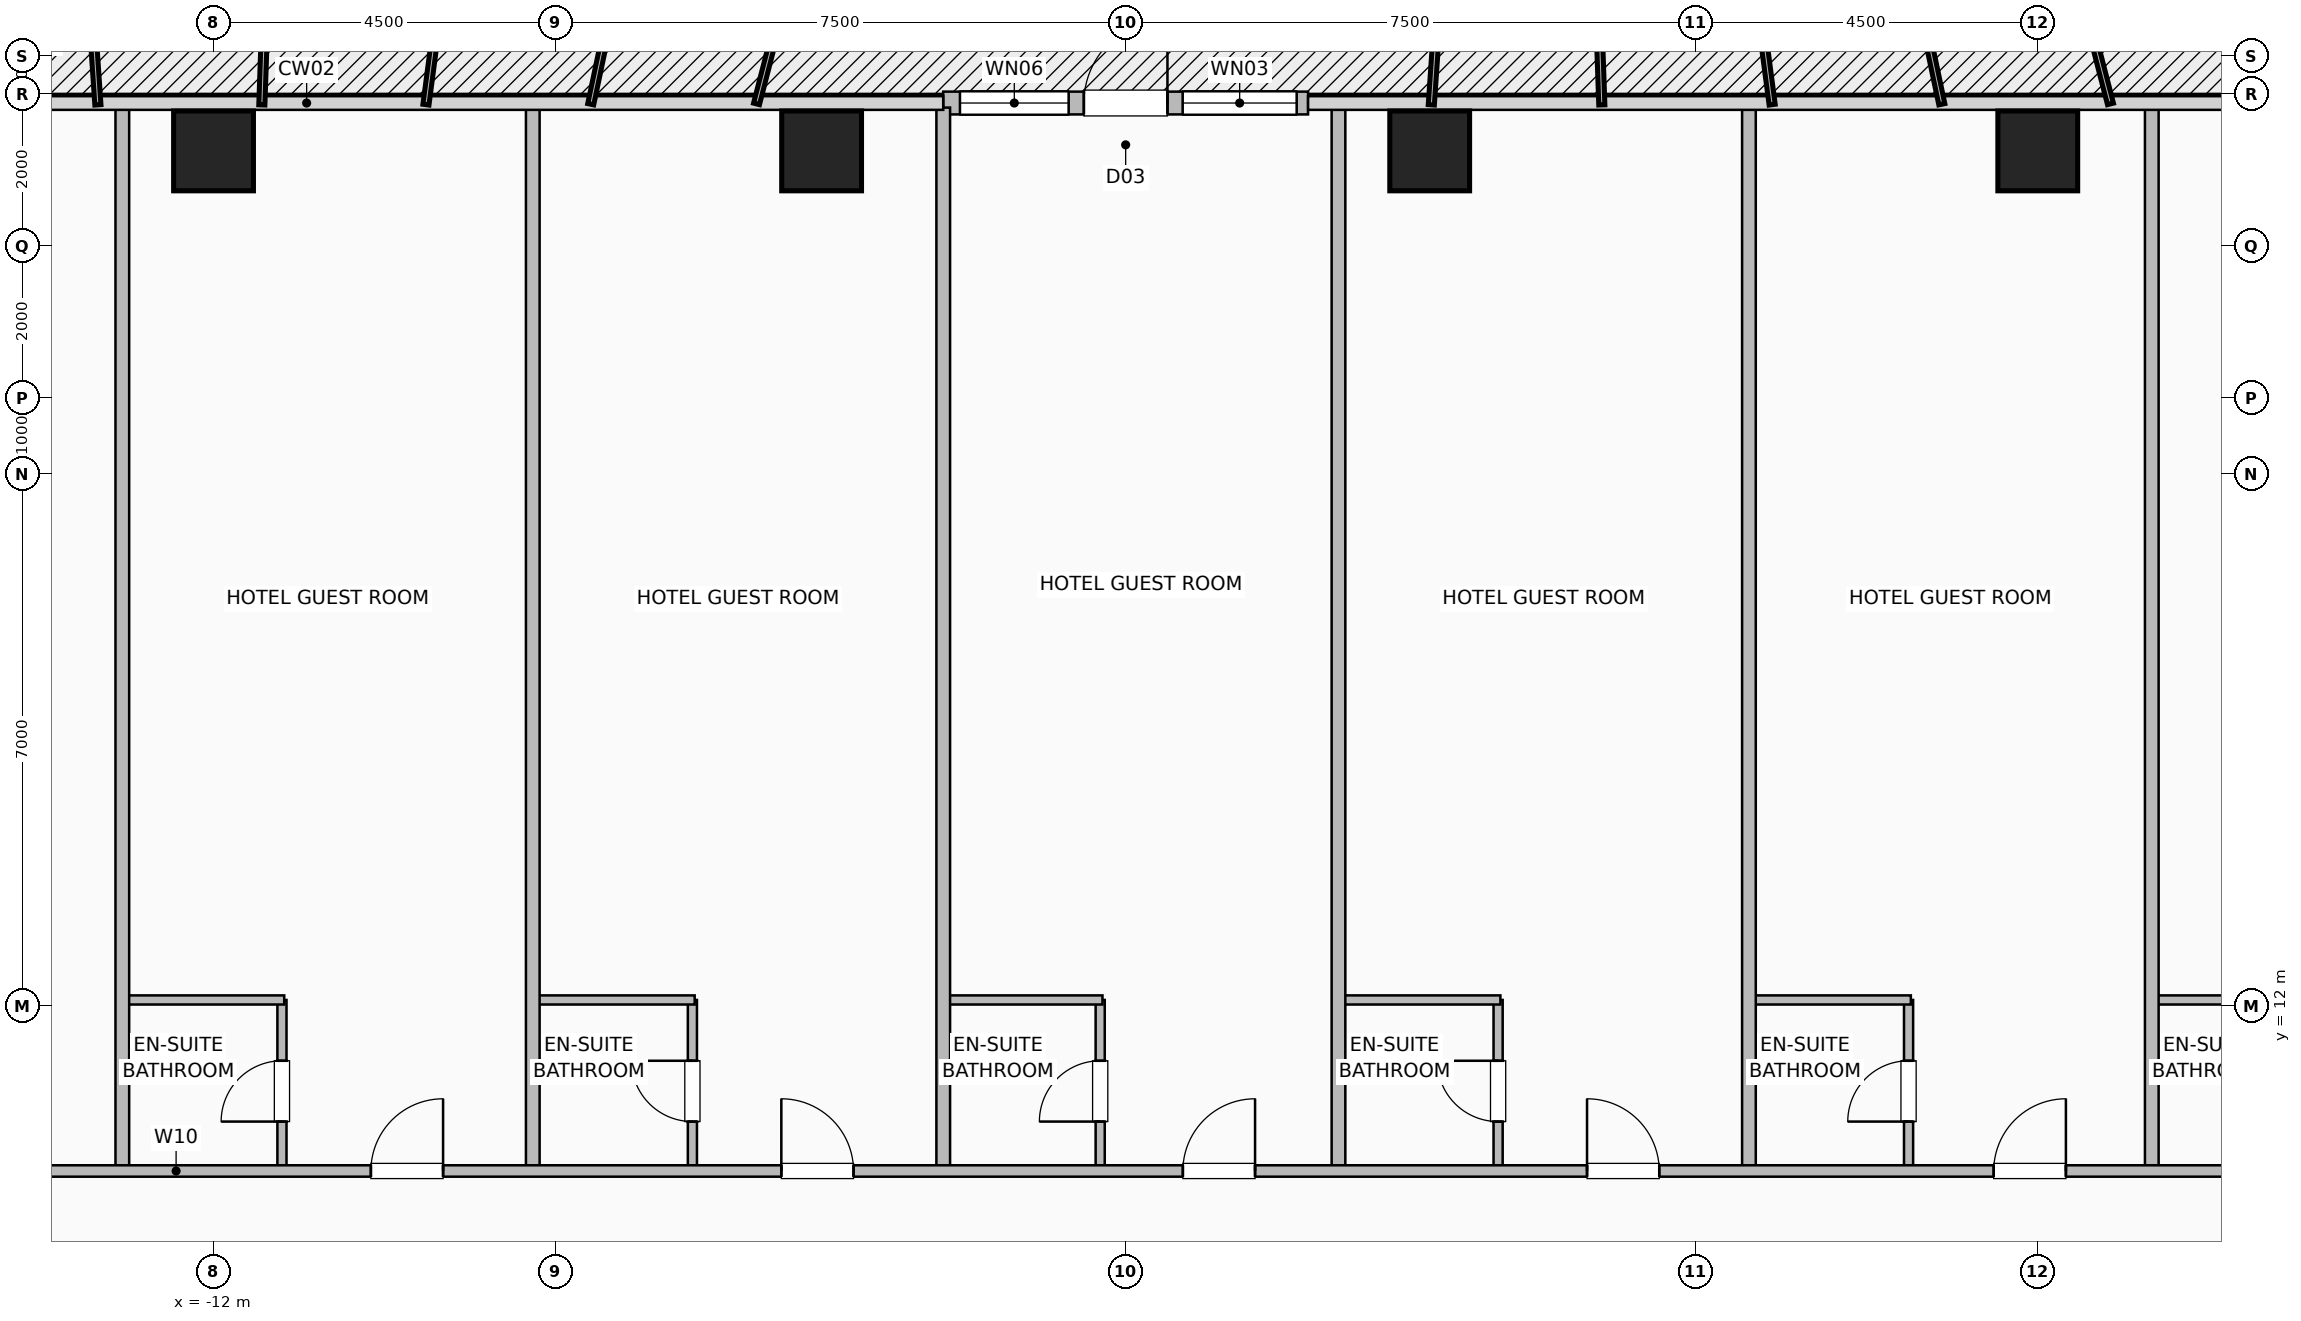
"""IFC4 building model, lengths in metres.
Left out: names, types, materials, properties, quantities, classifications, styles, units other than length and angle.
Written with IfcOpenShell. Run it as: python <this file> out.ifc"""

import sys

from ifc_helpers import new_model, si_unit, direction, frame, frame_2d, origin, origin_2d, place, context, subcontext, project, spatial, rectangle, hollow_rectangle, extrude, element, fill, save


model = new_model("IFC4")
c1 = context("Model", 3, precision=1e-05, world=origin(), true_north=direction((0.0, 1.0)))
c2 = subcontext(c1, "Body", "Model", "MODEL_VIEW")
j1 = project(units=[si_unit("LENGTHUNIT", "METRE"), si_unit("PLANEANGLEUNIT", "RADIAN")], contexts=[c1])
p1 = place(None, origin())
s1 = spatial("IfcSite", under=j1, at=p1, CompositionType="ELEMENT")
p2 = place(p1, origin())
s2 = spatial("IfcBuilding", under=s1, at=p2, CompositionType="ELEMENT")
p3 = place(p2, frame((0.0, 0.0, 27.0)))
s3 = spatial("IfcBuildingStorey", under=s2, at=p3, CompositionType="ELEMENT", Elevation=27.0)
p4 = place(p3, frame((-12.0, 23.25, -0.4), z_axis=(0.0, 0.0, 1.0), x_axis=(1.0, 0.0, 0.0)))
e1 = element("IfcColumn", 1, at=p4, inside=s3, PredefinedType="COLUMN", context=c2, shape_type="SweptSolid", body=[
    extrude(hollow_rectangle(XDim=1.05, YDim=1.05, WallThickness=0.05, at=origin_2d()), origin(), (0.0, 0.0, 1.0), 3.9),
])
for number, where, z_axis, x_axis in (
    (2, (-4.0, 23.25, 0.0), (0.0, 0.0, 1.0), (1.0, 0.0, 0.0)),
    (3, (4.0, 23.25, 0.0), (0.0, 0.0, 1.0), (1.0, 0.0, 0.0)),
):
    element("IfcColumn", number, at=place(p3, frame(where, z_axis=z_axis, x_axis=x_axis)), inside=s3, PredefinedType="COLUMN", context=c2, shape_type="SweptSolid", body=[
        extrude(hollow_rectangle(XDim=1.05, YDim=1.05, WallThickness=0.05, at=origin_2d()), origin(), (0.0, 0.0, 1.0), 3.5),
    ])
p5 = place(p3, frame((12.0, 23.25, -0.4), z_axis=(0.0, 0.0, 1.0), x_axis=(1.0, 0.0, 0.0)))
e4 = element("IfcColumn", 4, at=p5, inside=s3, PredefinedType="COLUMN", context=c2, shape_type="SweptSolid", body=[
    extrude(hollow_rectangle(XDim=1.05, YDim=1.05, WallThickness=0.05, at=origin_2d()), origin(), (0.0, 0.0, 1.0), 3.9),
])
p6 = place(p3, frame((-2.4, 23.88, 0.0), z_axis=(0.0, 0.0, 1.0), x_axis=(1.0, 0.0, 0.0)))
e5 = element("IfcWall", 5, at=p6, inside=s3, PredefinedType="SOLIDWALL", context=c2, shape_type="SweptSolid", body=[
    extrude(rectangle(XDim=4.8, YDim=0.3, at=frame_2d((2.4, 0.0))), origin(), (0.0, 0.0, 1.0), 3.25),
])
p7 = place(p6, frame((1.85, 0.0, 0.0)))
e6 = element("IfcOpeningElement", 6, at=p7, cuts=e5, PredefinedType="OPENING", context=c2, shape_type="SweptSolid", body=[
    extrude(rectangle(XDim=1.1, YDim=2.2, at=frame_2d((0.55, 1.1))), frame((0.0, 0.16, 0.0), z_axis=(0.0, -1.0, 0.0), x_axis=(1.0, 0.0, 0.0)), (0.0, 0.0, 1.0), 0.32),
])
p8 = place(p6, frame((0.22, 0.0, 0.85)))
e7 = element("IfcOpeningElement", 7, at=p8, cuts=e5, PredefinedType="OPENING", context=c2, shape_type="SweptSolid", body=[
    extrude(rectangle(XDim=1.43, YDim=1.8, at=frame_2d((0.715, 0.9))), frame((0.0, 0.16, 0.0), z_axis=(0.0, -1.0, 0.0), x_axis=(1.0, 0.0, 0.0)), (0.0, 0.0, 1.0), 0.32),
])
p9 = place(p6, frame((3.15, 0.0, 0.85)))
e8 = element("IfcOpeningElement", 8, at=p9, cuts=e5, PredefinedType="OPENING", context=c2, shape_type="SweptSolid", body=[
    extrude(rectangle(XDim=1.5, YDim=1.8, at=frame_2d((0.75, 0.9))), frame((0.0, 0.16, 0.0), z_axis=(0.0, -1.0, 0.0), x_axis=(1.0, 0.0, 0.0)), (0.0, 0.0, 1.0), 0.32),
])
p10 = place(p3, frame((-11.1, 9.83, 0.0), z_axis=(0.0, 0.0, 1.0), x_axis=(0.0, 1.0, 0.0)))
e9 = element("IfcWall", 9, at=p10, inside=s3, PredefinedType="PLUMBINGWALL", context=c2, shape_type="SweptSolid", body=[
    extrude(rectangle(XDim=2.25, YDim=0.12, at=frame_2d((1.125, 0.0))), origin(), (0.0, 0.0, 1.0), 3.25),
])
p11 = place(p10, frame((0.65, 0.0, 0.0)))
e10 = element("IfcOpeningElement", 10, at=p11, cuts=e9, PredefinedType="OPENING", context=c2, shape_type="SweptSolid", body=[
    extrude(rectangle(XDim=0.8, YDim=2.05, at=frame_2d((0.4, 1.025))), frame((0.0, 0.07, 0.0), z_axis=(0.0, -1.0, 0.0), x_axis=(1.0, 0.0, 0.0)), (0.0, 0.0, 1.0), 0.14),
])
p12 = place(p3, frame((-13.17, 12.08, 0.0), z_axis=(0.0, 0.0, 1.0), x_axis=(1.0, 0.0, 0.0)))
e11 = element("IfcWall", 11, at=p12, inside=s3, PredefinedType="PLUMBINGWALL", context=c2, shape_type="SweptSolid", body=[
    extrude(rectangle(XDim=2.1, YDim=0.12, at=frame_2d((1.05, 0.0))), origin(), (0.0, 0.0, 1.0), 3.25),
])
p13 = place(p3, frame((-5.7, 9.83, 0.0), z_axis=(0.0, 0.0, 1.0), x_axis=(0.0, 1.0, 0.0)))
e12 = element("IfcWall", 12, at=p13, inside=s3, PredefinedType="PLUMBINGWALL", context=c2, shape_type="SweptSolid", body=[
    extrude(rectangle(XDim=2.25, YDim=0.12, at=frame_2d((1.125, 0.0))), origin(), (0.0, 0.0, 1.0), 3.25),
])
p14 = place(p13, frame((0.65, 0.0, 0.0)))
e13 = element("IfcOpeningElement", 13, at=p14, cuts=e12, PredefinedType="OPENING", context=c2, shape_type="SweptSolid", body=[
    extrude(rectangle(XDim=0.8, YDim=2.05, at=frame_2d((0.4, 1.025))), frame((0.0, 0.07, 0.0), z_axis=(0.0, -1.0, 0.0), x_axis=(1.0, 0.0, 0.0)), (0.0, 0.0, 1.0), 0.14),
])
p15 = place(p3, frame((-7.77, 12.08, 0.0), z_axis=(0.0, 0.0, 1.0), x_axis=(1.0, 0.0, 0.0)))
e14 = element("IfcWall", 14, at=p15, inside=s3, PredefinedType="PLUMBINGWALL", context=c2, shape_type="SweptSolid", body=[
    extrude(rectangle(XDim=2.1, YDim=0.12, at=frame_2d((1.05, 0.0))), origin(), (0.0, 0.0, 1.0), 3.25),
])
p16 = place(p3, frame((-0.335, 9.83, 0.0), z_axis=(0.0, 0.0, 1.0), x_axis=(0.0, 1.0, 0.0)))
e15 = element("IfcWall", 15, at=p16, inside=s3, PredefinedType="PLUMBINGWALL", context=c2, shape_type="SweptSolid", body=[
    extrude(rectangle(XDim=2.25, YDim=0.12, at=frame_2d((1.125, 0.0))), origin(), (0.0, 0.0, 1.0), 3.25),
])
p17 = place(p16, frame((0.65, 0.0, 0.0)))
e16 = element("IfcOpeningElement", 16, at=p17, cuts=e15, PredefinedType="OPENING", context=c2, shape_type="SweptSolid", body=[
    extrude(rectangle(XDim=0.8, YDim=2.05, at=frame_2d((0.4, 1.025))), frame((0.0, 0.07, 0.0), z_axis=(0.0, -1.0, 0.0), x_axis=(1.0, 0.0, 0.0)), (0.0, 0.0, 1.0), 0.14),
])
p18 = place(p3, frame((-2.37, 12.08, 0.0), z_axis=(0.0, 0.0, 1.0), x_axis=(1.0, 0.0, 0.0)))
e17 = element("IfcWall", 17, at=p18, inside=s3, PredefinedType="PLUMBINGWALL", context=c2, shape_type="SweptSolid", body=[
    extrude(rectangle(XDim=2.065, YDim=0.12, at=frame_2d((1.033, 0.0))), origin(), (0.0, 0.0, 1.0), 3.25),
])
p19 = place(p3, frame((4.9, 9.83, 0.0), z_axis=(0.0, 0.0, 1.0), x_axis=(0.0, 1.0, 0.0)))
e18 = element("IfcWall", 18, at=p19, inside=s3, PredefinedType="PLUMBINGWALL", context=c2, shape_type="SweptSolid", body=[
    extrude(rectangle(XDim=2.25, YDim=0.12, at=frame_2d((1.125, 0.0))), origin(), (0.0, 0.0, 1.0), 2.818),
])
p20 = place(p19, frame((0.65, 0.0, 0.0)))
e19 = element("IfcOpeningElement", 19, at=p20, cuts=e18, PredefinedType="OPENING", context=c2, shape_type="SweptSolid", body=[
    extrude(rectangle(XDim=0.8, YDim=2.05, at=frame_2d((0.4, 1.025))), frame((0.0, 0.07, 0.0), z_axis=(0.0, -1.0, 0.0), x_axis=(1.0, 0.0, 0.0)), (0.0, 0.0, 1.0), 0.14),
])
p21 = place(p3, frame((2.83, 12.08, 0.0), z_axis=(0.0, 0.0, 1.0), x_axis=(1.0, 0.0, 0.0)))
e20 = element("IfcWall", 20, at=p21, inside=s3, PredefinedType="PLUMBINGWALL", context=c2, shape_type="SweptSolid", body=[
    extrude(rectangle(XDim=2.1, YDim=0.12, at=frame_2d((1.05, 0.0))), origin(), (0.0, 0.0, 1.0), 3.25),
])
p22 = place(p3, frame((10.3, 9.83, 0.0), z_axis=(0.0, 0.0, 1.0), x_axis=(0.0, 1.0, 0.0)))
e21 = element("IfcWall", 21, at=p22, inside=s3, PredefinedType="PLUMBINGWALL", context=c2, shape_type="SweptSolid", body=[
    extrude(rectangle(XDim=2.25, YDim=0.12, at=frame_2d((1.125, 0.0))), origin(), (0.0, 0.0, 1.0), 3.25),
])
p23 = place(p22, frame((0.65, 0.0, 0.0)))
e22 = element("IfcOpeningElement", 22, at=p23, cuts=e21, PredefinedType="OPENING", context=c2, shape_type="SweptSolid", body=[
    extrude(rectangle(XDim=0.8, YDim=2.05, at=frame_2d((0.4, 1.025))), frame((0.0, 0.07, 0.0), z_axis=(0.0, -1.0, 0.0), x_axis=(1.0, 0.0, 0.0)), (0.0, 0.0, 1.0), 0.14),
])
p24 = place(p3, frame((8.23, 12.08, 0.0), z_axis=(0.0, 0.0, 1.0), x_axis=(1.0, 0.0, 0.0)))
e23 = element("IfcWall", 23, at=p24, inside=s3, PredefinedType="PLUMBINGWALL", context=c2, shape_type="SweptSolid", body=[
    extrude(rectangle(XDim=2.1, YDim=0.12, at=frame_2d((1.05, 0.0))), origin(), (0.0, 0.0, 1.0), 3.25),
])
p25 = place(p3, frame((13.53, 12.08, 0.0), z_axis=(0.0, 0.0, 1.0), x_axis=(1.0, 0.0, 0.0)))
e24 = element("IfcWall", 24, at=p25, inside=s3, PredefinedType="PLUMBINGWALL", context=c2, shape_type="SweptSolid", body=[
    extrude(rectangle(XDim=2.1, YDim=0.12, at=frame_2d((1.05, 0.0))), origin(), (0.0, 0.0, 1.0), 3.25),
])
for number, where, z_axis, x_axis in (
    (25, (-13.2, 9.83, 0.0), (0.0, 0.0, 1.0), (0.0, 1.0, 0.0)),
    (26, (-7.8, 9.83, 0.0), (0.0, 0.0, 1.0), (0.0, 1.0, 0.0)),
    (27, (-2.4, 9.83, 0.0), (0.0, 0.0, 1.0), (0.0, 1.0, 0.0)),
    (28, (2.8, 9.83, 0.0), (0.0, 0.0, 1.0), (0.0, 1.0, 0.0)),
    (29, (8.2, 9.83, 0.0), (0.0, 0.0, 1.0), (0.0, 1.0, 0.0)),
    (30, (13.5, 9.83, 0.0), (0.0, 0.0, 1.0), (0.0, 1.0, 0.0)),
):
    element("IfcWall", number, at=place(p3, frame(where, z_axis=z_axis, x_axis=x_axis)), inside=s3, PredefinedType="PARTITIONING", context=c2, shape_type="SweptSolid", body=[
        extrude(rectangle(XDim=13.99, YDim=0.18, at=frame_2d((6.995, 0.0))), origin(), (0.0, 0.0, 1.0), 3.25),
    ])
p26 = place(p3, frame((-19.95, 9.83, 0.0), z_axis=(0.0, 0.0, 1.0), x_axis=(1.0, 0.0, 0.0)))
e31 = element("IfcWall", 31, at=p26, inside=s3, PredefinedType="PARTITIONING", context=c2, shape_type="SweptSolid", body=[
    extrude(rectangle(XDim=39.9, YDim=0.15, at=frame_2d((19.95, 0.0))), origin(), (0.0, 0.0, 1.0), 3.25),
])
p27 = place(p26, frame((3.945, 0.0, 0.0)))
e32 = element("IfcOpeningElement", 32, at=p27, cuts=e31, PredefinedType="OPENING", context=c2, shape_type="SweptSolid", body=[
    extrude(rectangle(XDim=0.95, YDim=2.08, at=frame_2d((0.475, 1.04))), frame((0.0, 0.085, 0.0), z_axis=(0.0, -1.0, 0.0), x_axis=(1.0, 0.0, 0.0)), (0.0, 0.0, 1.0), 0.17),
])
p28 = place(p26, frame((10.02, 0.0, 0.0)))
e33 = element("IfcOpeningElement", 33, at=p28, cuts=e31, PredefinedType="OPENING", context=c2, shape_type="SweptSolid", body=[
    extrude(rectangle(XDim=0.95, YDim=2.08, at=frame_2d((0.475, 1.04))), frame((0.0, 0.085, 0.0), z_axis=(0.0, -1.0, 0.0), x_axis=(1.0, 0.0, 0.0)), (0.0, 0.0, 1.0), 0.17),
])
p29 = place(p26, frame((15.42, 0.0, 0.0)))
e34 = element("IfcOpeningElement", 34, at=p29, cuts=e31, PredefinedType="OPENING", context=c2, shape_type="SweptSolid", body=[
    extrude(rectangle(XDim=0.95, YDim=2.08, at=frame_2d((0.475, 1.04))), frame((0.0, 0.085, 0.0), z_axis=(0.0, -1.0, 0.0), x_axis=(1.0, 0.0, 0.0)), (0.0, 0.0, 1.0), 0.17),
])
p30 = place(p26, frame((20.702, 0.0, 0.0)))
e35 = element("IfcOpeningElement", 35, at=p30, cuts=e31, PredefinedType="OPENING", context=c2, shape_type="SweptSolid", body=[
    extrude(rectangle(XDim=0.95, YDim=2.08, at=frame_2d((0.475, 1.04))), frame((0.0, 0.085, 0.0), z_axis=(0.0, -1.0, 0.0), x_axis=(1.0, 0.0, 0.0)), (0.0, 0.0, 1.0), 0.17),
])
p31 = place(p26, frame((26.02, 0.0, 0.0)))
e36 = element("IfcOpeningElement", 36, at=p31, cuts=e31, PredefinedType="OPENING", context=c2, shape_type="SweptSolid", body=[
    extrude(rectangle(XDim=0.95, YDim=2.08, at=frame_2d((0.475, 1.04))), frame((0.0, 0.085, 0.0), z_axis=(0.0, -1.0, 0.0), x_axis=(1.0, 0.0, 0.0)), (0.0, 0.0, 1.0), 0.17),
])
p32 = place(p26, frame((31.37, 0.0, 0.0)))
e37 = element("IfcOpeningElement", 37, at=p32, cuts=e31, PredefinedType="OPENING", context=c2, shape_type="SweptSolid", body=[
    extrude(rectangle(XDim=0.95, YDim=2.08, at=frame_2d((0.475, 1.04))), frame((0.0, 0.085, 0.0), z_axis=(0.0, -1.0, 0.0), x_axis=(1.0, 0.0, 0.0)), (0.0, 0.0, 1.0), 0.17),
])
p33 = place(p26, frame((37.245, 0.0, 0.0)))
e38 = element("IfcOpeningElement", 38, at=p33, cuts=e31, PredefinedType="OPENING", context=c2, shape_type="SweptSolid", body=[
    extrude(rectangle(XDim=0.95, YDim=2.08, at=frame_2d((0.475, 1.04))), frame((0.0, 0.085, 0.0), z_axis=(0.0, -1.0, 0.0), x_axis=(1.0, 0.0, 0.0)), (0.0, 0.0, 1.0), 0.17),
])
p34 = place(p7, origin())
e39 = element("IfcDoor", 39, at=p34, inside=s3, OperationType="SINGLE_SWING_RIGHT", PredefinedType="DOOR", context=c2, shape_type="SweptSolid", body=[
    extrude(rectangle(XDim=1.1, YDim=2.2, at=frame_2d((0.55, 1.1))), frame((0.0, 0.025, 0.0), z_axis=(0.0, -1.0, 0.0), x_axis=(1.0, 0.0, 0.0)), (0.0, 0.0, 1.0), 0.05),
])
fill(e6, e39)
p35 = place(p8, origin())
e40 = element("IfcWindow", 40, at=p35, inside=s3, PartitioningType="SINGLE_PANEL", PredefinedType="WINDOW", context=c2, shape_type="SweptSolid", body=[
    extrude(rectangle(XDim=1.43, YDim=1.8, at=frame_2d((0.715, 0.9))), frame((0.0, 0.03, 0.0), z_axis=(0.0, -1.0, 0.0), x_axis=(1.0, 0.0, 0.0)), (0.0, 0.0, 1.0), 0.06),
])
fill(e7, e40)
p36 = place(p9, origin())
e41 = element("IfcWindow", 41, at=p36, inside=s3, PartitioningType="SINGLE_PANEL", PredefinedType="WINDOW", context=c2, shape_type="SweptSolid", body=[
    extrude(rectangle(XDim=1.5, YDim=1.8, at=frame_2d((0.75, 0.9))), frame((0.0, 0.03, 0.0), z_axis=(0.0, -1.0, 0.0), x_axis=(1.0, 0.0, 0.0)), (0.0, 0.0, 1.0), 0.06),
])
fill(e8, e41)
p37 = place(p11, origin())
e42 = element("IfcDoor", 42, at=p37, inside=s3, OperationType="SINGLE_SWING_LEFT", PredefinedType="DOOR", context=c2, shape_type="SweptSolid", body=[
    extrude(rectangle(XDim=0.8, YDim=2.05, at=frame_2d((0.4, 1.025))), frame((0.0, 0.025, 0.0), z_axis=(0.0, -1.0, 0.0), x_axis=(1.0, 0.0, 0.0)), (0.0, 0.0, 1.0), 0.05),
])
fill(e10, e42)
p38 = place(p14, origin())
e43 = element("IfcDoor", 43, at=p38, inside=s3, OperationType="SINGLE_SWING_RIGHT", PredefinedType="DOOR", context=c2, shape_type="SweptSolid", body=[
    extrude(rectangle(XDim=0.8, YDim=2.05, at=frame_2d((0.4, 1.025))), frame((0.0, 0.025, 0.0), z_axis=(0.0, -1.0, 0.0), x_axis=(1.0, 0.0, 0.0)), (0.0, 0.0, 1.0), 0.05),
])
fill(e13, e43)
p39 = place(p17, origin())
e44 = element("IfcDoor", 44, at=p39, inside=s3, OperationType="SINGLE_SWING_LEFT", PredefinedType="DOOR", context=c2, shape_type="SweptSolid", body=[
    extrude(rectangle(XDim=0.8, YDim=2.05, at=frame_2d((0.4, 1.025))), frame((0.0, 0.025, 0.0), z_axis=(0.0, -1.0, 0.0), x_axis=(1.0, 0.0, 0.0)), (0.0, 0.0, 1.0), 0.05),
])
fill(e16, e44)
p40 = place(p20, origin())
e45 = element("IfcDoor", 45, at=p40, inside=s3, OperationType="SINGLE_SWING_RIGHT", PredefinedType="DOOR", context=c2, shape_type="SweptSolid", body=[
    extrude(rectangle(XDim=0.8, YDim=2.05, at=frame_2d((0.4, 1.025))), frame((0.0, 0.025, 0.0), z_axis=(0.0, -1.0, 0.0), x_axis=(1.0, 0.0, 0.0)), (0.0, 0.0, 1.0), 0.05),
])
fill(e19, e45)
p41 = place(p23, origin())
e46 = element("IfcDoor", 46, at=p41, inside=s3, OperationType="SINGLE_SWING_LEFT", PredefinedType="DOOR", context=c2, shape_type="SweptSolid", body=[
    extrude(rectangle(XDim=0.8, YDim=2.05, at=frame_2d((0.4, 1.025))), frame((0.0, 0.025, 0.0), z_axis=(0.0, -1.0, 0.0), x_axis=(1.0, 0.0, 0.0)), (0.0, 0.0, 1.0), 0.05),
])
fill(e22, e46)
p42 = place(p28, origin())
e47 = element("IfcDoor", 47, at=p42, inside=s3, OperationType="SINGLE_SWING_RIGHT", PredefinedType="DOOR", context=c2, shape_type="SweptSolid", body=[
    extrude(rectangle(XDim=0.95, YDim=2.08, at=frame_2d((0.475, 1.04))), frame((0.0, 0.025, 0.0), z_axis=(0.0, -1.0, 0.0), x_axis=(1.0, 0.0, 0.0)), (0.0, 0.0, 1.0), 0.05),
])
fill(e33, e47)
p43 = place(p29, origin())
e48 = element("IfcDoor", 48, at=p43, inside=s3, OperationType="SINGLE_SWING_LEFT", PredefinedType="DOOR", context=c2, shape_type="SweptSolid", body=[
    extrude(rectangle(XDim=0.95, YDim=2.08, at=frame_2d((0.475, 1.04))), frame((0.0, 0.025, 0.0), z_axis=(0.0, -1.0, 0.0), x_axis=(1.0, 0.0, 0.0)), (0.0, 0.0, 1.0), 0.05),
])
fill(e34, e48)
p44 = place(p30, origin())
e49 = element("IfcDoor", 49, at=p44, inside=s3, OperationType="SINGLE_SWING_RIGHT", PredefinedType="DOOR", context=c2, shape_type="SweptSolid", body=[
    extrude(rectangle(XDim=0.95, YDim=2.08, at=frame_2d((0.475, 1.04))), frame((0.0, 0.025, 0.0), z_axis=(0.0, -1.0, 0.0), x_axis=(1.0, 0.0, 0.0)), (0.0, 0.0, 1.0), 0.05),
])
fill(e35, e49)
p45 = place(p31, origin())
e50 = element("IfcDoor", 50, at=p45, inside=s3, OperationType="SINGLE_SWING_LEFT", PredefinedType="DOOR", context=c2, shape_type="SweptSolid", body=[
    extrude(rectangle(XDim=0.95, YDim=2.08, at=frame_2d((0.475, 1.04))), frame((0.0, 0.025, 0.0), z_axis=(0.0, -1.0, 0.0), x_axis=(1.0, 0.0, 0.0)), (0.0, 0.0, 1.0), 0.05),
])
fill(e36, e50)
p46 = place(p32, origin())
e51 = element("IfcDoor", 51, at=p46, inside=s3, OperationType="SINGLE_SWING_RIGHT", PredefinedType="DOOR", context=c2, shape_type="SweptSolid", body=[
    extrude(rectangle(XDim=0.95, YDim=2.08, at=frame_2d((0.475, 1.04))), frame((0.0, 0.025, 0.0), z_axis=(0.0, -1.0, 0.0), x_axis=(1.0, 0.0, 0.0)), (0.0, 0.0, 1.0), 0.05),
])
fill(e37, e51)
save(model, sys.argv[1])
